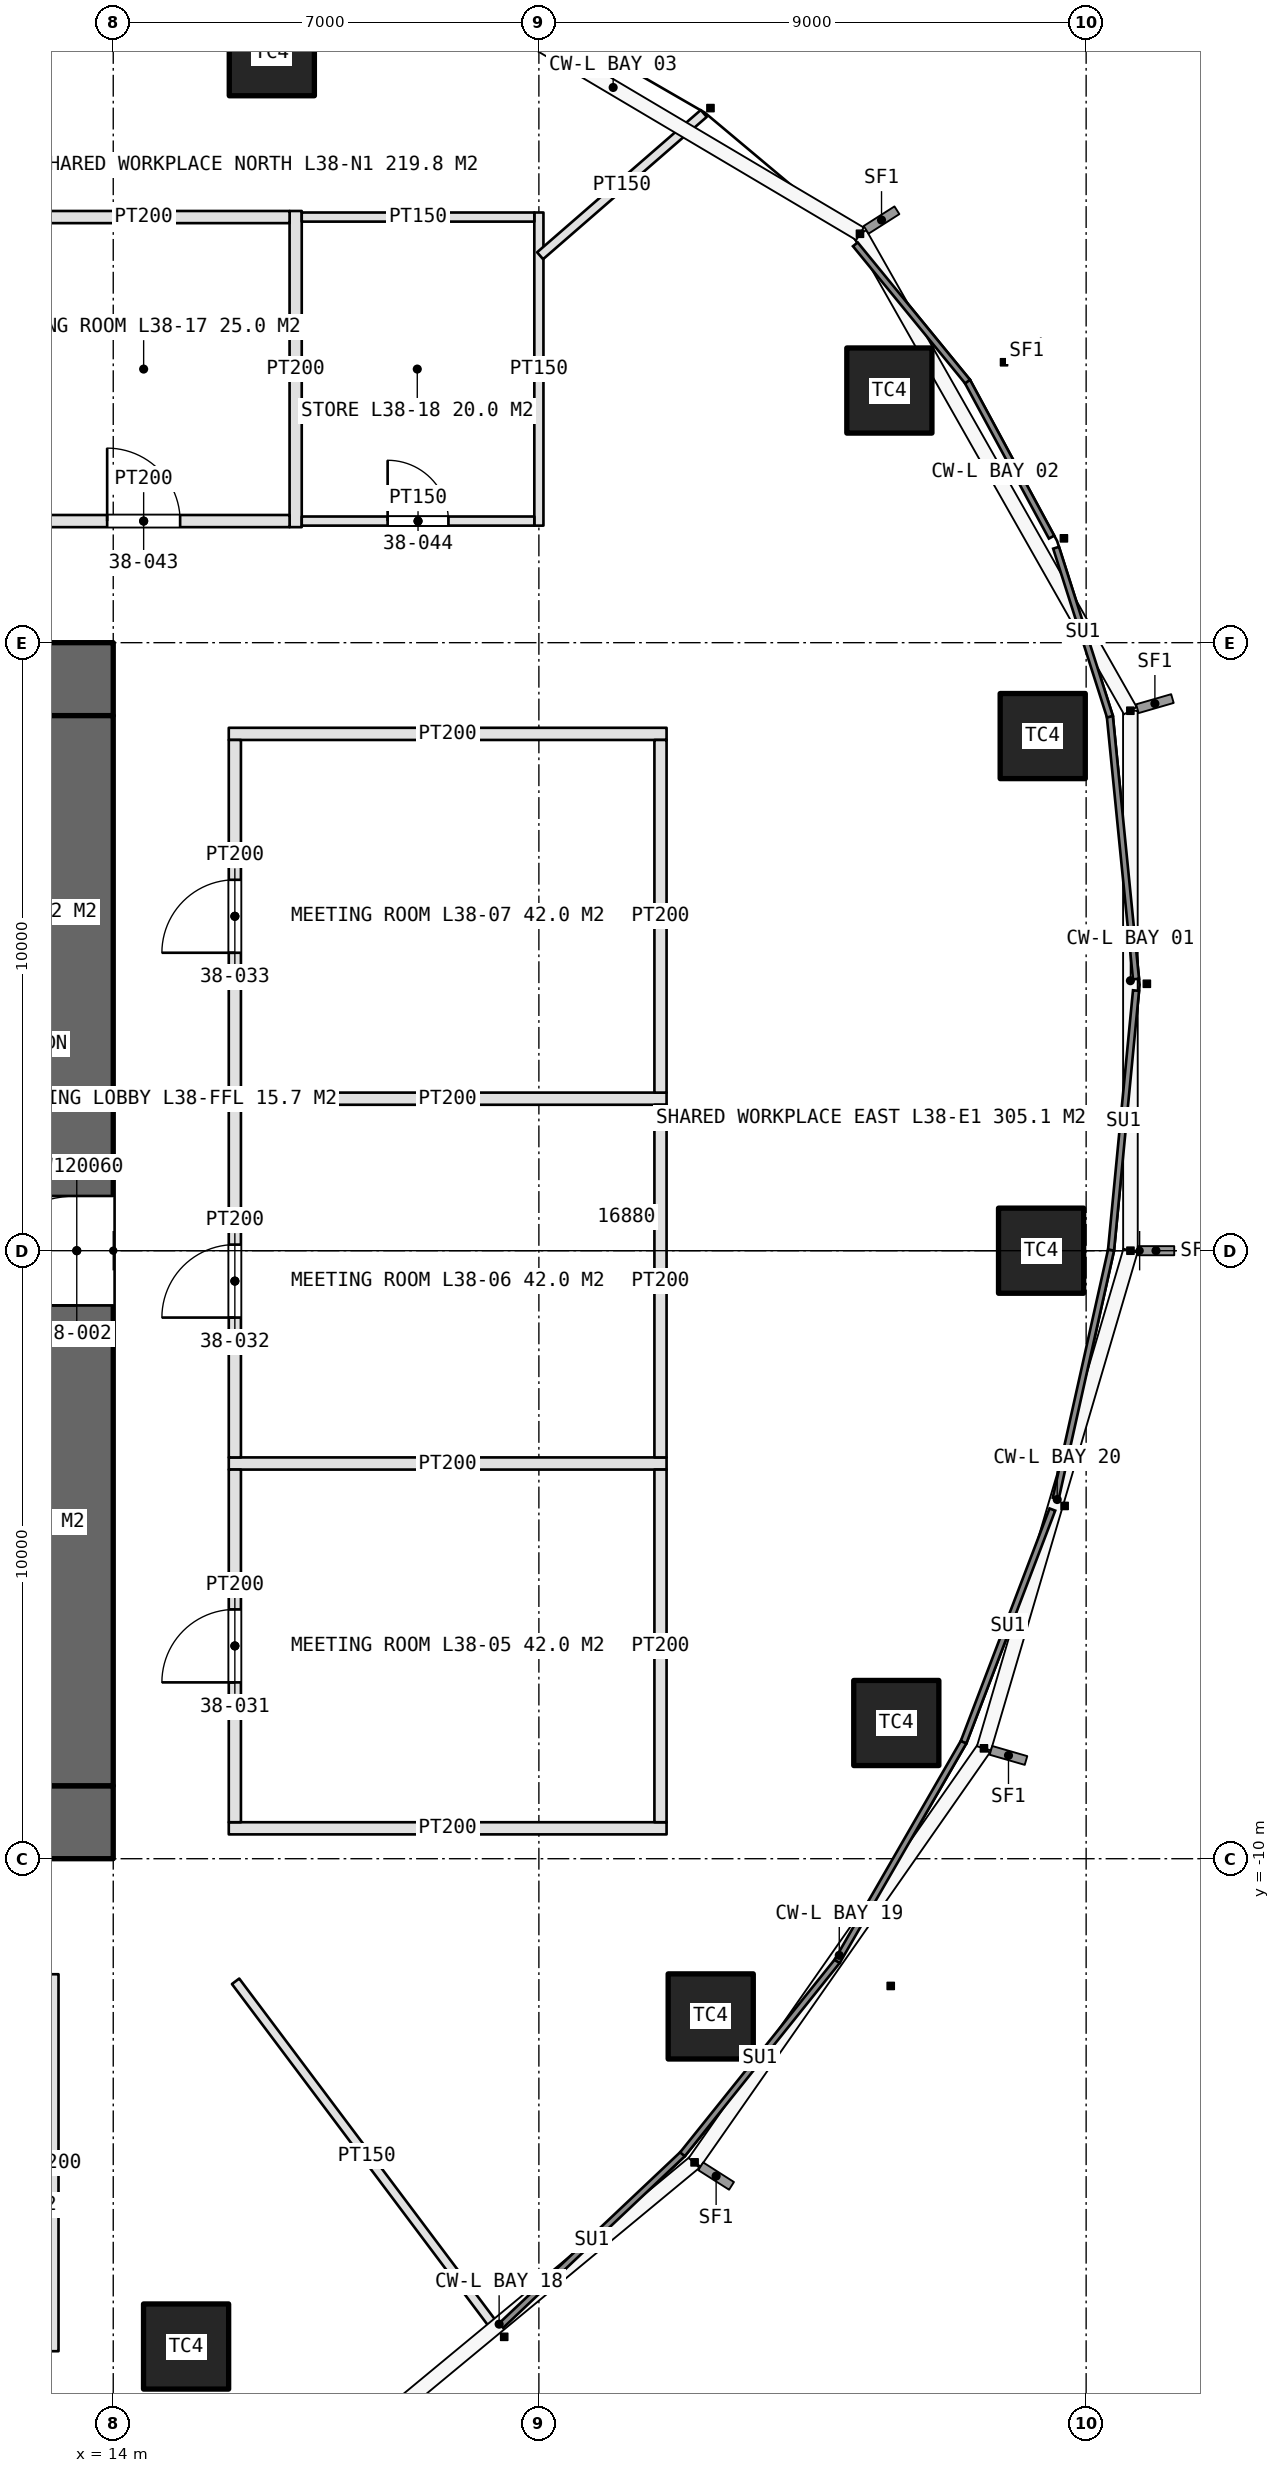
"""IFC4 building model, lengths in metres.
Left out: names, types, materials, properties, quantities, classifications, styles, units other than length and angle.
Written with IfcOpenShell. Run it as: python <this file> out.ifc"""

import sys

from ifc_helpers import new_model, si_unit, direction, frame, frame_2d, origin, origin_2d, place, context, subcontext, project, spatial, rectangle, extrude, element, fill, save


model = new_model("IFC4")
c1 = context("Model", 3, precision=1e-05, world=origin(), true_north=direction((0.0, 1.0)))
c2 = subcontext(c1, "Body", "Model", "MODEL_VIEW")
j1 = project(units=[si_unit("LENGTHUNIT", "METRE"), si_unit("PLANEANGLEUNIT", "RADIAN")], contexts=[c1])
p1 = place(None, origin())
s1 = spatial("IfcSite", under=j1, at=p1, CompositionType="ELEMENT")
p2 = place(p1, origin())
s2 = spatial("IfcBuilding", under=s1, at=p2, CompositionType="ELEMENT")
p3 = place(p2, frame((0.0, 0.0, 176.4)))
s3 = spatial("IfcBuildingStorey", under=s2, at=p3, CompositionType="ELEMENT", Elevation=176.4)
p4 = place(p3, frame((-14.0, -9.4, 0.0), z_axis=(0.0, 0.0, 1.0), x_axis=(1.0, 0.0, 0.0)))
e1 = element("IfcWall", 1, at=p4, inside=s3, PredefinedType="SHEAR", context=c2, shape_type="SweptSolid", body=[
    extrude(rectangle(XDim=28.0, YDim=1.2, at=frame_2d((14.0, 0.0))), origin(), (0.0, 0.0, 1.0), 4.2),
])
p5 = place(p4, frame((13.1, 0.0, 0.0)))
e2 = element("IfcOpeningElement", 2, at=p5, cuts=e1, PredefinedType="OPENING", context=c2, shape_type="SweptSolid", body=[
    extrude(rectangle(XDim=1.8, YDim=2.4, at=frame_2d((0.9, 1.2))), frame((0.0, 0.61, 0.0), z_axis=(0.0, -1.0, 0.0), x_axis=(1.0, 0.0, 0.0)), (0.0, 0.0, 1.0), 1.22),
])
p6 = place(p4, frame((22.9, 0.0, 0.0)))
e3 = element("IfcOpeningElement", 3, at=p6, cuts=e1, PredefinedType="OPENING", context=c2, shape_type="SweptSolid", body=[
    extrude(rectangle(XDim=2.2, YDim=2.7, at=frame_2d((1.1, 1.35))), frame((0.0, 0.61, 0.0), z_axis=(0.0, -1.0, 0.0), x_axis=(1.0, 0.0, 0.0)), (0.0, 0.0, 1.0), 1.22),
])
p7 = place(p3, frame((14.0, 9.4, 0.0), z_axis=(0.0, 0.0, 1.0), x_axis=(-1.0, 0.0, 0.0)))
e4 = element("IfcWall", 4, at=p7, inside=s3, PredefinedType="SHEAR", context=c2, shape_type="SweptSolid", body=[
    extrude(rectangle(XDim=28.0, YDim=1.2, at=frame_2d((14.0, 0.0))), origin(), (0.0, 0.0, 1.0), 4.2),
])
p8 = place(p7, frame((24.0, 0.0, 0.0)))
e5 = element("IfcOpeningElement", 5, at=p8, cuts=e4, PredefinedType="OPENING", context=c2, shape_type="SweptSolid", body=[
    extrude(rectangle(XDim=1.0, YDim=2.4, at=frame_2d((0.5, 1.2))), frame((0.0, 0.61, 0.0), z_axis=(0.0, -1.0, 0.0), x_axis=(1.0, 0.0, 0.0)), (0.0, 0.0, 1.0), 1.22),
])
p9 = place(p7, frame((13.1, 0.0, 0.0)))
e6 = element("IfcOpeningElement", 6, at=p9, cuts=e4, PredefinedType="OPENING", context=c2, shape_type="SweptSolid", body=[
    extrude(rectangle(XDim=1.8, YDim=2.4, at=frame_2d((0.9, 1.2))), frame((0.0, 0.61, 0.0), z_axis=(0.0, -1.0, 0.0), x_axis=(1.0, 0.0, 0.0)), (0.0, 0.0, 1.0), 1.22),
])
p10 = place(p3, frame((13.4, -8.8, 0.0), z_axis=(0.0, 0.0, 1.0), x_axis=(0.0, 1.0, 0.0)))
e7 = element("IfcWall", 7, at=p10, inside=s3, PredefinedType="SHEAR", context=c2, shape_type="SweptSolid", body=[
    extrude(rectangle(XDim=17.6, YDim=1.2, at=frame_2d((8.8, 0.0))), origin(), (0.0, 0.0, 1.0), 4.2),
])
p11 = place(p10, frame((7.9, 0.0, 0.0)))
e8 = element("IfcOpeningElement", 8, at=p11, cuts=e7, PredefinedType="OPENING", context=c2, shape_type="SweptSolid", body=[
    extrude(rectangle(XDim=1.8, YDim=2.4, at=frame_2d((0.9, 1.2))), frame((0.0, 0.61, 0.0), z_axis=(0.0, -1.0, 0.0), x_axis=(1.0, 0.0, 0.0)), (0.0, 0.0, 1.0), 1.22),
])
for number, where, z_axis, x_axis in (
    (9, (29.259, 0.0, 0.0), (0.0, 0.0, 1.0), (1.0, 0.0, 0.0)),
    (10, (29.286, 8.464, 0.0), (0.0, 0.0, 1.0), (1.0, 0.0, 0.0)),
    (11, (26.764, 14.147, 0.0), (0.0, 0.0, 1.0), (1.0, 0.0, 0.0)),
    (12, (16.608, 19.695, 0.0), (0.0, 0.0, 1.0), (1.0, 0.0, 0.0)),
    (13, (15.198, -18.023, 0.0), (0.0, 0.0, 1.0), (1.0, 0.0, 0.0)),
    (14, (23.826, -12.594, 0.0), (0.0, 0.0, 1.0), (1.0, 0.0, 0.0)),
    (15, (26.878, -7.768, 0.0), (0.0, 0.0, 1.0), (1.0, 0.0, 0.0)),
):
    element("IfcColumn", number, at=place(p3, frame(where, z_axis=z_axis, x_axis=x_axis)), inside=s3, PredefinedType="COLUMN", context=c2, shape_type="SweptSolid", body=[
        extrude(rectangle(XDim=1.4, YDim=1.4, at=origin_2d()), origin(), (0.0, 0.0, 1.0), 4.2),
    ])
for number, where, z_axis, x_axis in (
    (16, (15.9, -9.5, 0.0), (0.0, 0.0, 1.0), (1.0, 0.0, 0.0)),
    (17, (15.9, -3.5, 0.0), (0.0, 0.0, 1.0), (1.0, 0.0, 0.0)),
    (18, (15.9, 2.5, 0.0), (0.0, 0.0, 1.0), (1.0, 0.0, 0.0)),
    (19, (15.9, 8.5, 0.0), (0.0, 0.0, 1.0), (1.0, 0.0, 0.0)),
):
    element("IfcWall", number, at=place(p3, frame(where, z_axis=z_axis, x_axis=x_axis)), inside=s3, PredefinedType="PARTITIONING", context=c2, shape_type="SweptSolid", body=[
        extrude(rectangle(XDim=7.2, YDim=0.2, at=frame_2d((3.6, 0.0))), origin(), (0.0, 0.0, 1.0), 3.0),
    ])
p12 = place(p3, frame((16.0, -9.4, 0.0), z_axis=(0.0, 0.0, 1.0), x_axis=(0.0, 1.0, 0.0)))
e20 = element("IfcWall", 20, at=p12, inside=s3, PredefinedType="PARTITIONING", context=c2, shape_type="SweptSolid", body=[
    extrude(rectangle(XDim=5.8, YDim=0.2, at=frame_2d((2.9, 0.0))), origin(), (0.0, 0.0, 1.0), 3.0),
])
p13 = place(p12, frame((2.3, 0.0, 0.0)))
e21 = element("IfcOpeningElement", 21, at=p13, cuts=e20, PredefinedType="OPENING", context=c2, shape_type="SweptSolid", body=[
    extrude(rectangle(XDim=1.2, YDim=2.4, at=frame_2d((0.6, 1.2))), frame((0.0, 0.11, 0.0), z_axis=(0.0, -1.0, 0.0), x_axis=(1.0, 0.0, 0.0)), (0.0, 0.0, 1.0), 0.22),
])
p14 = place(p3, frame((23.0, -9.4, 0.0), z_axis=(0.0, 0.0, 1.0), x_axis=(0.0, 1.0, 0.0)))
e22 = element("IfcWall", 22, at=p14, inside=s3, PredefinedType="PARTITIONING", context=c2, shape_type="SweptSolid", body=[
    extrude(rectangle(XDim=5.8, YDim=0.2, at=frame_2d((2.9, 0.0))), origin(), (0.0, 0.0, 1.0), 3.0),
])
p15 = place(p3, frame((16.0, -3.4, 0.0), z_axis=(0.0, 0.0, 1.0), x_axis=(0.0, 1.0, 0.0)))
e23 = element("IfcWall", 23, at=p15, inside=s3, PredefinedType="PARTITIONING", context=c2, shape_type="SweptSolid", body=[
    extrude(rectangle(XDim=5.8, YDim=0.2, at=frame_2d((2.9, 0.0))), origin(), (0.0, 0.0, 1.0), 3.0),
])
p16 = place(p15, frame((2.3, 0.0, 0.0)))
e24 = element("IfcOpeningElement", 24, at=p16, cuts=e23, PredefinedType="OPENING", context=c2, shape_type="SweptSolid", body=[
    extrude(rectangle(XDim=1.2, YDim=2.4, at=frame_2d((0.6, 1.2))), frame((0.0, 0.11, 0.0), z_axis=(0.0, -1.0, 0.0), x_axis=(1.0, 0.0, 0.0)), (0.0, 0.0, 1.0), 0.22),
])
p17 = place(p3, frame((23.0, -3.4, 0.0), z_axis=(0.0, 0.0, 1.0), x_axis=(0.0, 1.0, 0.0)))
e25 = element("IfcWall", 25, at=p17, inside=s3, PredefinedType="PARTITIONING", context=c2, shape_type="SweptSolid", body=[
    extrude(rectangle(XDim=5.8, YDim=0.2, at=frame_2d((2.9, 0.0))), origin(), (0.0, 0.0, 1.0), 3.0),
])
p18 = place(p3, frame((16.0, 2.6, 0.0), z_axis=(0.0, 0.0, 1.0), x_axis=(0.0, 1.0, 0.0)))
e26 = element("IfcWall", 26, at=p18, inside=s3, PredefinedType="PARTITIONING", context=c2, shape_type="SweptSolid", body=[
    extrude(rectangle(XDim=5.8, YDim=0.2, at=frame_2d((2.9, 0.0))), origin(), (0.0, 0.0, 1.0), 3.0),
])
p19 = place(p18, frame((2.3, 0.0, 0.0)))
e27 = element("IfcOpeningElement", 27, at=p19, cuts=e26, PredefinedType="OPENING", context=c2, shape_type="SweptSolid", body=[
    extrude(rectangle(XDim=1.2, YDim=2.4, at=frame_2d((0.6, 1.2))), frame((0.0, 0.11, 0.0), z_axis=(0.0, -1.0, 0.0), x_axis=(1.0, 0.0, 0.0)), (0.0, 0.0, 1.0), 0.22),
])
p20 = place(p3, frame((23.0, 2.6, 0.0), z_axis=(0.0, 0.0, 1.0), x_axis=(0.0, 1.0, 0.0)))
e28 = element("IfcWall", 28, at=p20, inside=s3, PredefinedType="PARTITIONING", context=c2, shape_type="SweptSolid", body=[
    extrude(rectangle(XDim=5.8, YDim=0.2, at=frame_2d((2.9, 0.0))), origin(), (0.0, 0.0, 1.0), 3.0),
])
p21 = place(p3, frame((13.0, -11.9, 0.0), z_axis=(0.0, 0.0, 1.0), x_axis=(0.0, -1.0, 0.0)))
e29 = element("IfcWall", 29, at=p21, inside=s3, PredefinedType="PARTITIONING", context=c2, shape_type="SweptSolid", body=[
    extrude(rectangle(XDim=6.2, YDim=0.2, at=frame_2d((3.1, 0.0))), origin(), (0.0, 0.0, 1.0), 3.0),
])
p22 = place(p3, frame((17.0, 11.9, 0.0), z_axis=(0.0, 0.0, 1.0), x_axis=(0.0, 1.0, 0.0)))
e30 = element("IfcWall", 30, at=p22, inside=s3, PredefinedType="PARTITIONING", context=c2, shape_type="SweptSolid", body=[
    extrude(rectangle(XDim=5.2, YDim=0.2, at=frame_2d((2.6, 0.0))), origin(), (0.0, 0.0, 1.0), 3.0),
])
p23 = place(p3, frame((21.0, 11.925, 0.0), z_axis=(0.0, 0.0, 1.0), x_axis=(0.0, 1.0, 0.0)))
e31 = element("IfcWall", 31, at=p23, inside=s3, PredefinedType="PARTITIONING", context=c2, shape_type="SweptSolid", body=[
    extrude(rectangle(XDim=5.15, YDim=0.15, at=frame_2d((2.575, 0.0))), origin(), (0.0, 0.0, 1.0), 3.0),
])
p24 = place(p3, frame((12.1, 12.0, 0.0), z_axis=(0.0, 0.0, 1.0), x_axis=(1.0, 0.0, 0.0)))
e32 = element("IfcWall", 32, at=p24, inside=s3, PredefinedType="PARTITIONING", context=c2, shape_type="SweptSolid", body=[
    extrude(rectangle(XDim=4.8, YDim=0.2, at=frame_2d((2.4, 0.0))), origin(), (0.0, 0.0, 1.0), 3.0),
])
p25 = place(p24, frame((1.8, 0.0, 0.0)))
e33 = element("IfcOpeningElement", 33, at=p25, cuts=e32, PredefinedType="OPENING", context=c2, shape_type="SweptSolid", body=[
    extrude(rectangle(XDim=1.2, YDim=2.4, at=frame_2d((0.6, 1.2))), frame((0.0, 0.11, 0.0), z_axis=(0.0, -1.0, 0.0), x_axis=(1.0, 0.0, 0.0)), (0.0, 0.0, 1.0), 0.22),
])
p26 = place(p3, frame((12.1, 17.0, 0.0), z_axis=(0.0, 0.0, 1.0), x_axis=(1.0, 0.0, 0.0)))
e34 = element("IfcWall", 34, at=p26, inside=s3, PredefinedType="PARTITIONING", context=c2, shape_type="SweptSolid", body=[
    extrude(rectangle(XDim=4.8, YDim=0.2, at=frame_2d((2.4, 0.0))), origin(), (0.0, 0.0, 1.0), 3.0),
])
p27 = place(p3, frame((17.1, 12.0, 0.0), z_axis=(0.0, 0.0, 1.0), x_axis=(1.0, 0.0, 0.0)))
e35 = element("IfcWall", 35, at=p27, inside=s3, PredefinedType="PARTITIONING", context=c2, shape_type="SweptSolid", body=[
    extrude(rectangle(XDim=3.825, YDim=0.15, at=frame_2d((1.913, 0.0))), origin(), (0.0, 0.0, 1.0), 3.0),
])
p28 = place(p27, frame((1.413, 0.0, 0.0)))
e36 = element("IfcOpeningElement", 36, at=p28, cuts=e35, PredefinedType="OPENING", context=c2, shape_type="SweptSolid", body=[
    extrude(rectangle(XDim=1.0, YDim=2.2, at=frame_2d((0.5, 1.1))), frame((0.0, 0.085, 0.0), z_axis=(0.0, -1.0, 0.0), x_axis=(1.0, 0.0, 0.0)), (0.0, 0.0, 1.0), 0.17),
])
p29 = place(p3, frame((17.1, 17.0, 0.0), z_axis=(0.0, 0.0, 1.0), x_axis=(1.0, 0.0, 0.0)))
e37 = element("IfcWall", 37, at=p29, inside=s3, PredefinedType="PARTITIONING", context=c2, shape_type="SweptSolid", body=[
    extrude(rectangle(XDim=3.825, YDim=0.15, at=frame_2d((1.913, 0.0))), origin(), (0.0, 0.0, 1.0), 3.0),
])
p30 = place(p3, frame((16.012, -12.016, 0.0), z_axis=(0.0, 0.0, 1.0), x_axis=(0.600059749679, -0.799955184254, 0.0)))
e38 = element("IfcWall", 38, at=p30, inside=s3, PredefinedType="PARTITIONING", context=c2, shape_type="SweptSolid", body=[
    extrude(rectangle(XDim=7.191, YDim=0.15, at=frame_2d((3.596, 0.0))), origin(), (0.0, 0.0, 1.0), 3.0),
])
p31 = place(p3, frame((21.02, 16.364, 0.0), z_axis=(0.0, 0.0, 1.0), x_axis=(0.75467183248, 0.656102450278, 0.0)))
e39 = element("IfcWall", 39, at=p31, inside=s3, PredefinedType="PARTITIONING", context=c2, shape_type="SweptSolid", body=[
    extrude(rectangle(XDim=3.567, YDim=0.15, at=frame_2d((1.783, 0.0))), origin(), (0.0, 0.0, 1.0), 3.0),
])
p32 = place(p11, origin())
e40 = element("IfcDoor", 40, at=p32, inside=s3, OperationType="DOUBLE_DOOR_SINGLE_SWING", PredefinedType="DOOR", context=c2, shape_type="SweptSolid", body=[
    extrude(rectangle(XDim=1.8, YDim=2.4, at=frame_2d((0.9, 1.2))), frame((0.0, 0.025, 0.0), z_axis=(0.0, -1.0, 0.0), x_axis=(1.0, 0.0, 0.0)), (0.0, 0.0, 1.0), 0.05),
])
fill(e8, e40)
p33 = place(p13, origin())
e41 = element("IfcDoor", 41, at=p33, inside=s3, OperationType="SINGLE_SWING_LEFT", PredefinedType="DOOR", context=c2, shape_type="SweptSolid", body=[
    extrude(rectangle(XDim=1.2, YDim=2.4, at=frame_2d((0.6, 1.2))), frame((0.0, 0.025, 0.0), z_axis=(0.0, -1.0, 0.0), x_axis=(1.0, 0.0, 0.0)), (0.0, 0.0, 1.0), 0.05),
])
fill(e21, e41)
p34 = place(p16, origin())
e42 = element("IfcDoor", 42, at=p34, inside=s3, OperationType="SINGLE_SWING_LEFT", PredefinedType="DOOR", context=c2, shape_type="SweptSolid", body=[
    extrude(rectangle(XDim=1.2, YDim=2.4, at=frame_2d((0.6, 1.2))), frame((0.0, 0.025, 0.0), z_axis=(0.0, -1.0, 0.0), x_axis=(1.0, 0.0, 0.0)), (0.0, 0.0, 1.0), 0.05),
])
fill(e24, e42)
p35 = place(p19, origin())
e43 = element("IfcDoor", 43, at=p35, inside=s3, OperationType="SINGLE_SWING_LEFT", PredefinedType="DOOR", context=c2, shape_type="SweptSolid", body=[
    extrude(rectangle(XDim=1.2, YDim=2.4, at=frame_2d((0.6, 1.2))), frame((0.0, 0.025, 0.0), z_axis=(0.0, -1.0, 0.0), x_axis=(1.0, 0.0, 0.0)), (0.0, 0.0, 1.0), 0.05),
])
fill(e27, e43)
p36 = place(p25, origin())
e44 = element("IfcDoor", 44, at=p36, inside=s3, OperationType="SINGLE_SWING_LEFT", PredefinedType="DOOR", context=c2, shape_type="SweptSolid", body=[
    extrude(rectangle(XDim=1.2, YDim=2.4, at=frame_2d((0.6, 1.2))), frame((0.0, 0.025, 0.0), z_axis=(0.0, -1.0, 0.0), x_axis=(1.0, 0.0, 0.0)), (0.0, 0.0, 1.0), 0.05),
])
fill(e33, e44)
p37 = place(p28, origin())
e45 = element("IfcDoor", 45, at=p37, inside=s3, OperationType="SINGLE_SWING_LEFT", PredefinedType="DOOR", context=c2, shape_type="SweptSolid", body=[
    extrude(rectangle(XDim=1.0, YDim=2.2, at=frame_2d((0.5, 1.1))), frame((0.0, 0.025, 0.0), z_axis=(0.0, -1.0, 0.0), x_axis=(1.0, 0.0, 0.0)), (0.0, 0.0, 1.0), 0.05),
])
fill(e36, e45)
save(model, sys.argv[1])
